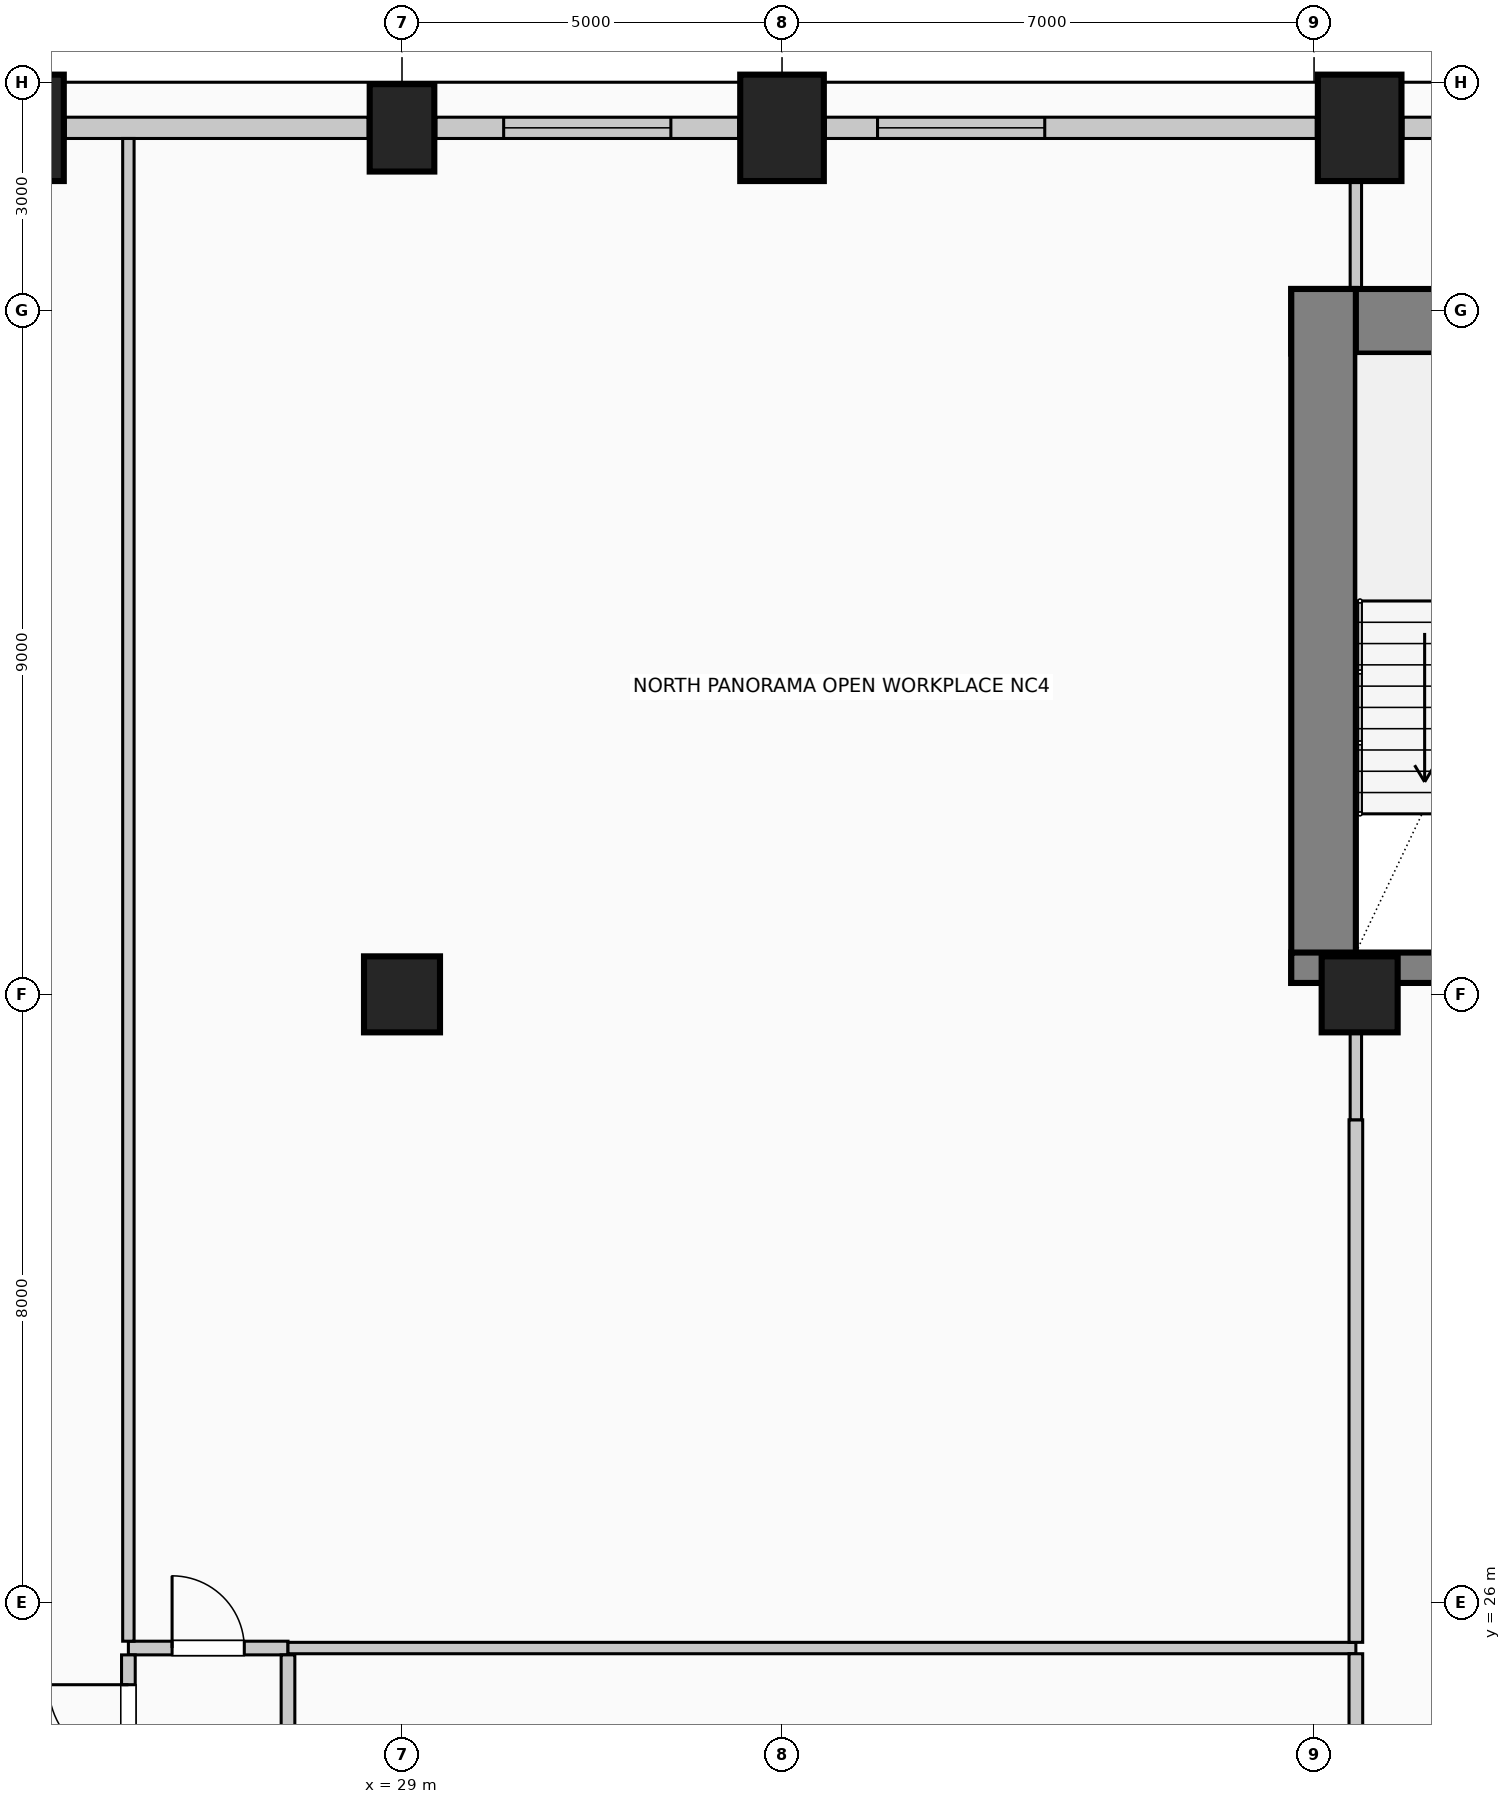
"""IFC4 building model, lengths in metres.
Left out: names, types, materials, properties, quantities, classifications, styles, units other than length and angle.
Written with IfcOpenShell. Run it as: python <this file> out.ifc"""

import sys

from ifc_helpers import new_model, si_unit, direction, frame, frame_2d, origin, origin_2d, place, context, subcontext, project, spatial, rectangle, circle, extrude, element, fill, save


model = new_model("IFC4")
c1 = context("Model", 3, precision=1e-05, world=origin(), true_north=direction((0.0, 1.0)))
c2 = subcontext(c1, "Body", "Model", "MODEL_VIEW")
j1 = project(units=[si_unit("LENGTHUNIT", "METRE"), si_unit("PLANEANGLEUNIT", "RADIAN")], contexts=[c1])
p1 = place(None, origin())
s1 = spatial("IfcSite", under=j1, at=p1, CompositionType="ELEMENT")
p2 = place(p1, origin())
s2 = spatial("IfcBuilding", under=s1, at=p2, CompositionType="ELEMENT")
p3 = place(p2, frame((0.0, 0.0, 108.6)))
s3 = spatial("IfcBuildingStorey", under=s2, at=p3, CompositionType="ELEMENT", Elevation=108.6)
p4 = place(p3, frame((40.7, 42.855, 0.0), z_axis=(0.0, 0.0, 1.0), x_axis=(1.0, 0.0, 0.0)))
e1 = element("IfcWall", 1, at=p4, inside=s3, PredefinedType="SHEAR", context=c2, shape_type="SweptSolid", body=[
    extrude(rectangle(XDim=14.6, YDim=0.85, at=frame_2d((7.3, 0.0))), origin(), (0.0, 0.0, 1.0), 4.0),
])
p5 = place(p3, frame((41.125, 34.15, 0.0), z_axis=(0.0, 0.0, 1.0), x_axis=(0.0, 1.0, 0.0)))
e2 = element("IfcWall", 2, at=p5, inside=s3, PredefinedType="SHEAR", context=c2, shape_type="SweptSolid", body=[
    extrude(rectangle(XDim=9.13, YDim=0.85, at=frame_2d((4.565, 0.0))), origin(), (0.0, 0.0, 1.0), 4.0),
])
p6 = place(p3, frame((40.7, 34.35, 0.0), z_axis=(0.0, 0.0, 1.0), x_axis=(1.0, 0.0, 0.0)))
e3 = element("IfcWall", 3, at=p6, inside=s3, PredefinedType="SHEAR", context=c2, shape_type="SweptSolid", body=[
    extrude(rectangle(XDim=5.01, YDim=0.4, at=frame_2d((2.505, 0.0))), origin(), (0.0, 0.0, 1.0), 4.0),
])
p7 = place(p6, frame((2.4, 0.0, 0.0)))
e4 = element("IfcOpeningElement", 4, at=p7, cuts=e3, PredefinedType="OPENING", context=c2, shape_type="SweptSolid", body=[
    extrude(rectangle(XDim=1.15, YDim=2.2, at=frame_2d((0.575, 1.1))), frame((0.0, 0.21, 0.0), z_axis=(0.0, -1.0, 0.0), x_axis=(1.0, 0.0, 0.0)), (0.0, 0.0, 1.0), 0.42),
])
p8 = place(p3, frame((24.0, 45.4, 0.0), z_axis=(0.0, 0.0, 1.0), x_axis=(1.0, 0.0, 0.0)))
e5 = element("IfcColumn", 5, at=p8, inside=s3, PredefinedType="COLUMN", context=c2, shape_type="SweptSolid", body=[
    extrude(rectangle(XDim=1.1, YDim=1.4, at=origin_2d()), origin(), (0.0, 0.0, 1.0), 4.0),
])
p9 = place(p3, frame((29.0, 45.4, 0.0), z_axis=(0.0, 0.0, 1.0), x_axis=(1.0, 0.0, 0.0)))
e6 = element("IfcColumn", 6, at=p9, inside=s3, PredefinedType="COLUMN", context=c2, shape_type="SweptSolid", body=[
    extrude(rectangle(XDim=0.85, YDim=1.15, at=origin_2d()), origin(), (0.0, 0.0, 1.0), 4.0),
])
for number, where, z_axis, x_axis in (
    (7, (34.0, 45.4, 0.0), (0.0, 0.0, 1.0), (1.0, 0.0, 0.0)),
    (8, (41.6, 45.4, 0.0), (0.0, 0.0, 1.0), (1.0, 0.0, 0.0)),
):
    element("IfcColumn", number, at=place(p3, frame(where, z_axis=z_axis, x_axis=x_axis)), inside=s3, PredefinedType="COLUMN", context=c2, shape_type="SweptSolid", body=[
        extrude(rectangle(XDim=1.1, YDim=1.4, at=origin_2d()), origin(), (0.0, 0.0, 1.0), 4.0),
    ])
for number, where, z_axis, x_axis in (
    (9, (29.0, 34.0, 0.0), (0.0, 0.0, 1.0), (1.0, 0.0, 0.0)),
    (10, (41.6, 34.0, 0.0), (0.0, 0.0, 1.0), (1.0, 0.0, 0.0)),
):
    element("IfcColumn", number, at=place(p3, frame(where, z_axis=z_axis, x_axis=x_axis)), inside=s3, PredefinedType="COLUMN", context=c2, shape_type="SweptSolid", body=[
        extrude(circle(Radius=0.5, at=origin_2d()), origin(), (0.0, 0.0, 1.0), 4.0),
    ])
p10 = place(p3, frame((24.57, 45.4, 0.0), z_axis=(0.0, 0.0, 1.0), x_axis=(1.0, 0.0, 0.0)))
e11 = element("IfcWall", 11, at=p10, inside=s3, PredefinedType="SOLIDWALL", context=c2, shape_type="SweptSolid", body=[
    extrude(rectangle(XDim=3.985, YDim=0.28, at=frame_2d((1.992, 0.0))), origin(), (0.0, 0.0, 1.0), 2.875),
])
p11 = place(p3, frame((29.445, 45.4, 0.0), z_axis=(0.0, 0.0, 1.0), x_axis=(1.0, 0.0, 0.0)))
e12 = element("IfcWall", 12, at=p11, inside=s3, PredefinedType="SOLIDWALL", context=c2, shape_type="SweptSolid", body=[
    extrude(rectangle(XDim=3.985, YDim=0.28, at=frame_2d((1.992, 0.0))), origin(), (0.0, 0.0, 1.0), 2.875),
])
p12 = place(p11, frame((0.893, 0.0, 0.5)))
e13 = element("IfcOpeningElement", 13, at=p12, cuts=e12, PredefinedType="OPENING", context=c2, shape_type="SweptSolid", body=[
    extrude(rectangle(XDim=2.2, YDim=1.95, at=frame_2d((1.1, 0.975))), frame((0.0, 0.15, 0.0), z_axis=(0.0, -1.0, 0.0), x_axis=(1.0, 0.0, 0.0)), (0.0, 0.0, 1.0), 0.3),
])
p13 = place(p3, frame((34.57, 45.4, 0.0), z_axis=(0.0, 0.0, 1.0), x_axis=(1.0, 0.0, 0.0)))
e14 = element("IfcWall", 14, at=p13, inside=s3, PredefinedType="SOLIDWALL", context=c2, shape_type="SweptSolid", body=[
    extrude(rectangle(XDim=6.46, YDim=0.28, at=frame_2d((3.23, 0.0))), origin(), (0.0, 0.0, 1.0), 2.875),
])
p14 = place(p13, frame((0.687, 0.0, 0.5)))
e15 = element("IfcOpeningElement", 15, at=p14, cuts=e14, PredefinedType="OPENING", context=c2, shape_type="SweptSolid", body=[
    extrude(rectangle(XDim=2.2, YDim=1.95, at=frame_2d((1.1, 0.975))), frame((0.0, 0.15, 0.0), z_axis=(0.0, -1.0, 0.0), x_axis=(1.0, 0.0, 0.0)), (0.0, 0.0, 1.0), 0.3),
])
p15 = place(p3, frame((42.17, 45.4, 0.0), z_axis=(0.0, 0.0, 1.0), x_axis=(1.0, 0.0, 0.0)))
e16 = element("IfcWall", 16, at=p15, inside=s3, PredefinedType="SOLIDWALL", context=c2, shape_type="SweptSolid", body=[
    extrude(rectangle(XDim=1.385, YDim=0.28, at=frame_2d((0.692, 0.0))), origin(), (0.0, 0.0, 1.0), 2.875),
])
p16 = place(p3, frame((25.4, 25.4, 0.0), z_axis=(0.0, 0.0, 1.0), x_axis=(1.0, 0.0, 0.0)))
e17 = element("IfcWall", 17, at=p16, inside=s3, PredefinedType="PARTITIONING", context=c2, shape_type="SweptSolid", body=[
    extrude(rectangle(XDim=2.1, YDim=0.18, at=frame_2d((1.05, 0.0))), origin(), (0.0, 0.0, 1.0), 3.17),
])
p17 = place(p16, frame((0.575, 0.0, 0.0)))
e18 = element("IfcOpeningElement", 18, at=p17, cuts=e17, PredefinedType="OPENING", context=c2, shape_type="SweptSolid", body=[
    extrude(rectangle(XDim=0.95, YDim=2.15, at=frame_2d((0.475, 1.075))), frame((0.0, 0.1, 0.0), z_axis=(0.0, -1.0, 0.0), x_axis=(1.0, 0.0, 0.0)), (0.0, 0.0, 1.0), 0.2),
])
p18 = place(p3, frame((27.5, 25.4, 0.0), z_axis=(0.0, 0.0, 1.0), x_axis=(1.0, 0.0, 0.0)))
e19 = element("IfcWall", 19, at=p18, inside=s3, PredefinedType="PARTITIONING", context=c2, shape_type="SweptSolid", body=[
    extrude(rectangle(XDim=14.05, YDim=0.15, at=frame_2d((7.025, 0.0))), origin(), (0.0, 0.0, 1.0), 3.17),
])
p19 = place(p3, frame((25.4, 23.475, 0.0), z_axis=(0.0, 0.0, 1.0), x_axis=(0.0, 1.0, 0.0)))
e20 = element("IfcWall", 20, at=p19, inside=s3, PredefinedType="PARTITIONING", context=c2, shape_type="SweptSolid", body=[
    extrude(rectangle(XDim=1.835, YDim=0.18, at=frame_2d((0.917, 0.0))), origin(), (0.0, 0.0, 1.0), 3.725),
])
p20 = place(p19, frame((0.393, 0.0, 0.0)))
e21 = element("IfcOpeningElement", 21, at=p20, cuts=e20, PredefinedType="OPENING", context=c2, shape_type="SweptSolid", body=[
    extrude(rectangle(XDim=1.05, YDim=2.15, at=frame_2d((0.525, 1.075))), frame((0.0, 0.1, 0.0), z_axis=(0.0, -1.0, 0.0), x_axis=(1.0, 0.0, 0.0)), (0.0, 0.0, 1.0), 0.2),
])
p21 = place(p3, frame((25.4, 25.49, 0.0), z_axis=(0.0, 0.0, 1.0), x_axis=(0.0, 1.0, 0.0)))
e22 = element("IfcWall", 22, at=p21, inside=s3, PredefinedType="PARTITIONING", context=c2, shape_type="SweptSolid", body=[
    extrude(rectangle(XDim=19.77, YDim=0.15, at=frame_2d((9.885, 0.0))), origin(), (0.0, 0.0, 1.0), 3.725),
])
p22 = place(p3, frame((27.5, 15.74, 0.0), z_axis=(0.0, 0.0, 1.0), x_axis=(0.0, 1.0, 0.0)))
e23 = element("IfcWall", 23, at=p22, inside=s3, PredefinedType="PARTITIONING", context=c2, shape_type="SweptSolid", body=[
    extrude(rectangle(XDim=9.57, YDim=0.18, at=frame_2d((4.785, 0.0))), origin(), (0.0, 0.0, 1.0), 3.725),
])
p23 = place(p3, frame((41.55, 18.5, 0.0), z_axis=(0.0, 0.0, 1.0), x_axis=(0.0, 1.0, 0.0)))
e24 = element("IfcWall", 24, at=p23, inside=s3, PredefinedType="PARTITIONING", context=c2, shape_type="SweptSolid", body=[
    extrude(rectangle(XDim=6.825, YDim=0.18, at=frame_2d((3.413, 0.0))), origin(), (0.0, 0.0, 1.0), 3.07),
])
p24 = place(p3, frame((41.55, 25.475, 0.0), z_axis=(0.0, 0.0, 1.0), x_axis=(0.0, 1.0, 0.0)))
e25 = element("IfcWall", 25, at=p24, inside=s3, PredefinedType="PARTITIONING", context=c2, shape_type="SweptSolid", body=[
    extrude(rectangle(XDim=6.875, YDim=0.18, at=frame_2d((3.438, 0.0))), origin(), (0.0, 0.0, 1.0), 3.07),
])
p25 = place(p3, frame((41.55, 32.35, 0.0), z_axis=(0.0, 0.0, 1.0), x_axis=(0.0, 1.0, 0.0)))
e26 = element("IfcWall", 26, at=p25, inside=s3, PredefinedType="PARTITIONING", context=c2, shape_type="SweptSolid", body=[
    extrude(rectangle(XDim=1.15, YDim=0.15, at=frame_2d((0.575, 0.0))), origin(), (0.0, 0.0, 1.0), 3.07),
])
p26 = place(p3, frame((41.55, 43.28, 0.0), z_axis=(0.0, 0.0, 1.0), x_axis=(0.0, 1.0, 0.0)))
e27 = element("IfcWall", 27, at=p26, inside=s3, PredefinedType="PARTITIONING", context=c2, shape_type="SweptSolid", body=[
    extrude(rectangle(XDim=1.42, YDim=0.15, at=frame_2d((0.71, 0.0))), origin(), (0.0, 0.0, 1.0), 3.725),
])
p27 = place(p12, origin())
e28 = element("IfcWindow", 28, at=p27, inside=s3, PartitioningType="SINGLE_PANEL", PredefinedType="WINDOW", context=c2, shape_type="SweptSolid", body=[
    extrude(rectangle(XDim=2.2, YDim=1.95, at=frame_2d((1.1, 0.975))), frame((0.0, 0.03, 0.0), z_axis=(0.0, -1.0, 0.0), x_axis=(1.0, 0.0, 0.0)), (0.0, 0.0, 1.0), 0.06),
])
fill(e13, e28)
p28 = place(p14, origin())
e29 = element("IfcWindow", 29, at=p28, inside=s3, PartitioningType="SINGLE_PANEL", PredefinedType="WINDOW", context=c2, shape_type="SweptSolid", body=[
    extrude(rectangle(XDim=2.2, YDim=1.95, at=frame_2d((1.1, 0.975))), frame((0.0, 0.03, 0.0), z_axis=(0.0, -1.0, 0.0), x_axis=(1.0, 0.0, 0.0)), (0.0, 0.0, 1.0), 0.06),
])
fill(e15, e29)
p29 = place(p17, origin())
e30 = element("IfcDoor", 30, at=p29, inside=s3, OperationType="SINGLE_SWING_LEFT", PredefinedType="DOOR", context=c2, shape_type="SweptSolid", body=[
    extrude(rectangle(XDim=0.95, YDim=2.15, at=frame_2d((0.475, 1.075))), frame((0.0, 0.025, 0.0), z_axis=(0.0, -1.0, 0.0), x_axis=(1.0, 0.0, 0.0)), (0.0, 0.0, 1.0), 0.05),
])
fill(e18, e30)
p30 = place(p20, origin())
e31 = element("IfcDoor", 31, at=p30, inside=s3, OperationType="SINGLE_SWING_RIGHT", PredefinedType="DOOR", context=c2, shape_type="SweptSolid", body=[
    extrude(rectangle(XDim=1.05, YDim=2.15, at=frame_2d((0.525, 1.075))), frame((0.0, 0.025, 0.0), z_axis=(0.0, -1.0, 0.0), x_axis=(1.0, 0.0, 0.0)), (0.0, 0.0, 1.0), 0.05),
])
fill(e21, e31)
save(model, sys.argv[1])
